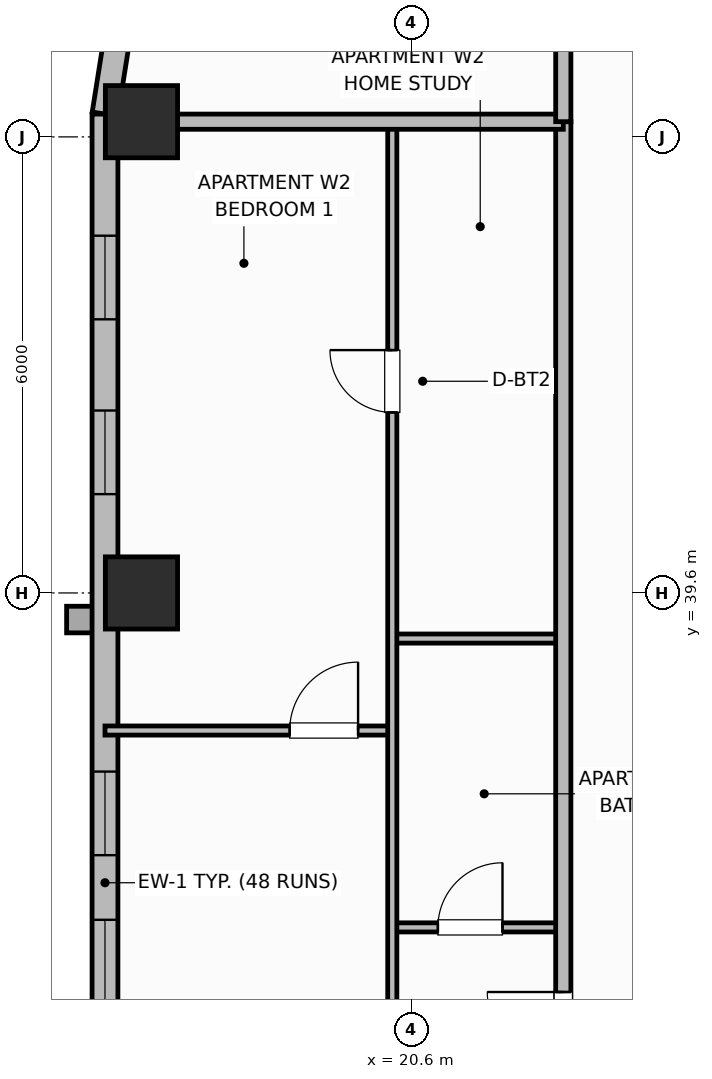
"""IFC4 building model, lengths in metres.
Left out: names, types, materials, properties, quantities, classifications, styles, units other than length and angle.
Written with IfcOpenShell. Run it as: python <this file> out.ifc"""

import sys

from ifc_helpers import new_model, si_unit, direction, frame, frame_2d, origin, origin_2d, place, context, subcontext, project, spatial, rectangle, extrude, element, fill, save


model = new_model("IFC4")
c1 = context("Model", 3, precision=1e-05, world=origin(), true_north=direction((0.0, 1.0)))
c2 = subcontext(c1, "Body", "Model", "MODEL_VIEW")
j1 = project(units=[si_unit("LENGTHUNIT", "METRE"), si_unit("PLANEANGLEUNIT", "RADIAN")], contexts=[c1])
p1 = place(None, origin())
s1 = spatial("IfcSite", under=j1, at=p1, CompositionType="ELEMENT")
p2 = place(p1, origin())
s2 = spatial("IfcBuilding", under=s1, at=p2, CompositionType="ELEMENT")
p3 = place(p2, frame((0.0, 0.0, 177.4)))
s3 = spatial("IfcBuildingStorey", under=s2, at=p3, CompositionType="ELEMENT", Elevation=177.4)
for number, where, z_axis, x_axis in (
    (1, (17.05, 39.6, 0.0), (0.0, 0.0, 1.0), (1.0, 0.0, 0.0)),
    (2, (17.05, 45.8, 0.0), (0.0, 0.0, 1.0), (1.0, 0.0, 0.0)),
):
    element("IfcColumn", number, at=place(p3, frame(where, z_axis=z_axis, x_axis=x_axis)), inside=s3, PredefinedType="COLUMN", context=c2, shape_type="SweptSolid", body=[
        extrude(rectangle(XDim=0.95, YDim=0.95, at=origin_2d()), origin(), (0.0, 0.0, 1.0), 3.7),
    ])
p4 = place(p3, frame((16.748, 47.022, 0.0), z_axis=(0.0, 0.0, 1.0), x_axis=(-0.156481329164, -0.987680916907, 0.0)))
e3 = element("IfcWall", 3, at=p4, inside=s3, PredefinedType="SOLIDWALL", context=c2, shape_type="SweptSolid", body=[
    extrude(rectangle(XDim=1.136, YDim=0.34, at=frame_2d((0.568, 0.0))), origin(), (0.0, 0.0, 1.0), 2.72),
])
p5 = place(p3, frame((16.57, 45.9, 0.0), z_axis=(0.0, 0.0, 1.0), x_axis=(0.0, -1.0, 0.0)))
e4 = element("IfcWall", 4, at=p5, inside=s3, PredefinedType="SOLIDWALL", context=c2, shape_type="SweptSolid", body=[
    extrude(rectangle(XDim=13.3, YDim=0.34, at=frame_2d((6.65, 0.0))), origin(), (0.0, 0.0, 1.0), 2.72),
])
p6 = place(p5, frame((1.6, 0.0, 0.95)))
e5 = element("IfcOpeningElement", 5, at=p6, cuts=e4, PredefinedType="OPENING", context=c2, shape_type="SweptSolid", body=[
    extrude(rectangle(XDim=1.1, YDim=1.65, at=frame_2d((0.55, 0.825))), frame((0.0, 0.18, 0.0), z_axis=(0.0, -1.0, 0.0), x_axis=(1.0, 0.0, 0.0)), (0.0, 0.0, 1.0), 0.36),
])
p7 = place(p5, frame((3.9, 0.0, 0.95)))
e6 = element("IfcOpeningElement", 6, at=p7, cuts=e4, PredefinedType="OPENING", context=c2, shape_type="SweptSolid", body=[
    extrude(rectangle(XDim=1.1, YDim=1.65, at=frame_2d((0.55, 0.825))), frame((0.0, 0.18, 0.0), z_axis=(0.0, -1.0, 0.0), x_axis=(1.0, 0.0, 0.0)), (0.0, 0.0, 1.0), 0.36),
])
p8 = place(p5, frame((8.65, 0.0, 0.95)))
e7 = element("IfcOpeningElement", 7, at=p8, cuts=e4, PredefinedType="OPENING", context=c2, shape_type="SweptSolid", body=[
    extrude(rectangle(XDim=1.1, YDim=1.65, at=frame_2d((0.55, 0.825))), frame((0.0, 0.18, 0.0), z_axis=(0.0, -1.0, 0.0), x_axis=(1.0, 0.0, 0.0)), (0.0, 0.0, 1.0), 0.36),
])
p9 = place(p5, frame((10.6, 0.0, 0.95)))
e8 = element("IfcOpeningElement", 8, at=p9, cuts=e4, PredefinedType="OPENING", context=c2, shape_type="SweptSolid", body=[
    extrude(rectangle(XDim=1.1, YDim=1.65, at=frame_2d((0.55, 0.825))), frame((0.0, 0.18, 0.0), z_axis=(0.0, -1.0, 0.0), x_axis=(1.0, 0.0, 0.0)), (0.0, 0.0, 1.0), 0.36),
])
p10 = place(p3, frame((20.35, 35.2, 0.0), z_axis=(0.0, 0.0, 1.0), x_axis=(1.0, 0.0, 0.0)))
e9 = element("IfcWall", 9, at=p10, inside=s3, PredefinedType="PARTITIONING", context=c2, shape_type="SweptSolid", body=[
    extrude(rectangle(XDim=2.25, YDim=0.12, at=frame_2d((1.125, 0.0))), origin(), (0.0, 0.0, 1.0), 2.55),
])
p11 = place(p10, frame((0.6, 0.0, 0.0)))
e10 = element("IfcOpeningElement", 10, at=p11, cuts=e9, PredefinedType="OPENING", context=c2, shape_type="SweptSolid", body=[
    extrude(rectangle(XDim=0.85, YDim=2.1, at=frame_2d((0.425, 1.05))), frame((0.0, 0.07, 0.0), z_axis=(0.0, -1.0, 0.0), x_axis=(1.0, 0.0, 0.0)), (0.0, 0.0, 1.0), 0.14),
])
p12 = place(p3, frame((20.35, 39.0, 0.0), z_axis=(0.0, 0.0, 1.0), x_axis=(1.0, 0.0, 0.0)))
e11 = element("IfcWall", 11, at=p12, inside=s3, PredefinedType="PARTITIONING", context=c2, shape_type="SweptSolid", body=[
    extrude(rectangle(XDim=2.25, YDim=0.12, at=frame_2d((1.125, 0.0))), origin(), (0.0, 0.0, 1.0), 2.55),
])
p13 = place(p3, frame((16.57, 37.79, 0.0), z_axis=(0.0, 0.0, 1.0), x_axis=(1.0, 0.0, 0.0)))
e12 = element("IfcWall", 12, at=p13, inside=s3, PredefinedType="PARTITIONING", context=c2, shape_type="SweptSolid", body=[
    extrude(rectangle(XDim=3.78, YDim=0.12, at=frame_2d((1.89, 0.0))), origin(), (0.0, 0.0, 1.0), 2.55),
])
p14 = place(p13, frame((2.43, 0.0, 0.0)))
e13 = element("IfcOpeningElement", 13, at=p14, cuts=e12, PredefinedType="OPENING", context=c2, shape_type="SweptSolid", body=[
    extrude(rectangle(XDim=0.9, YDim=2.1, at=frame_2d((0.45, 1.05))), frame((0.0, 0.07, 0.0), z_axis=(0.0, -1.0, 0.0), x_axis=(1.0, 0.0, 0.0)), (0.0, 0.0, 1.0), 0.14),
])
p15 = place(p3, frame((20.35, 29.84, 0.0), z_axis=(0.0, 0.0, 1.0), x_axis=(0.0, 1.0, 0.0)))
e14 = element("IfcWall", 14, at=p15, inside=s3, PredefinedType="PARTITIONING", context=c2, shape_type="SweptSolid", body=[
    extrude(rectangle(XDim=15.92, YDim=0.12, at=frame_2d((7.96, 0.0))), origin(), (0.0, 0.0, 1.0), 2.55),
])
p16 = place(p15, frame((0.61, 0.0, 0.0)))
e15 = element("IfcOpeningElement", 15, at=p16, cuts=e14, PredefinedType="OPENING", context=c2, shape_type="SweptSolid", body=[
    extrude(rectangle(XDim=0.9, YDim=2.1, at=frame_2d((0.45, 1.05))), frame((0.0, 0.07, 0.0), z_axis=(0.0, -1.0, 0.0), x_axis=(1.0, 0.0, 0.0)), (0.0, 0.0, 1.0), 0.14),
])
p17 = place(p15, frame((12.135, 0.0, 0.0)))
e16 = element("IfcOpeningElement", 16, at=p17, cuts=e14, PredefinedType="OPENING", context=c2, shape_type="SweptSolid", body=[
    extrude(rectangle(XDim=0.82, YDim=2.08, at=frame_2d((0.41, 1.04))), frame((0.0, 0.07, 0.0), z_axis=(0.0, -1.0, 0.0), x_axis=(1.0, 0.0, 0.0)), (0.0, 0.0, 1.0), 0.14),
])
p18 = place(p3, frame((22.6, 10.6, 0.0), z_axis=(0.0, 0.0, 1.0), x_axis=(0.0, 1.0, 0.0)))
e17 = element("IfcWall", 17, at=p18, inside=s3, PredefinedType="PARTITIONING", context=c2, shape_type="SweptSolid", body=[
    extrude(rectangle(XDim=35.2, YDim=0.2, at=frame_2d((17.6, 0.0))), origin(), (0.0, 0.0, 1.0), 2.55),
])
p19 = place(p18, frame((2.65, 0.0, 0.0)))
e18 = element("IfcOpeningElement", 18, at=p19, cuts=e17, PredefinedType="OPENING", context=c2, shape_type="SweptSolid", body=[
    extrude(rectangle(XDim=1.0, YDim=2.15, at=frame_2d((0.5, 1.075))), frame((0.0, 0.11, 0.0), z_axis=(0.0, -1.0, 0.0), x_axis=(1.0, 0.0, 0.0)), (0.0, 0.0, 1.0), 0.22),
])
p20 = place(p18, frame((22.75, 0.0, 0.0)))
e19 = element("IfcOpeningElement", 19, at=p20, cuts=e17, PredefinedType="OPENING", context=c2, shape_type="SweptSolid", body=[
    extrude(rectangle(XDim=1.0, YDim=2.15, at=frame_2d((0.5, 1.075))), frame((0.0, 0.11, 0.0), z_axis=(0.0, -1.0, 0.0), x_axis=(1.0, 0.0, 0.0)), (0.0, 0.0, 1.0), 0.22),
])
p21 = place(p3, frame((16.99, 45.8, 0.0), z_axis=(0.0, 0.0, 1.0), x_axis=(1.0, 0.0, 0.0)))
e20 = element("IfcWall", 20, at=p21, inside=s3, PredefinedType="PARTITIONING", context=c2, shape_type="SweptSolid", body=[
    extrude(rectangle(XDim=5.61, YDim=0.2, at=frame_2d((2.805, 0.0))), origin(), (0.0, 0.0, 1.0), 2.55),
])
p22 = place(p3, frame((22.6, 45.8, 0.0), z_axis=(0.0, 0.0, 1.0), x_axis=(0.0, 1.0, 0.0)))
e21 = element("IfcWall", 21, at=p22, inside=s3, PredefinedType="PARTITIONING", context=c2, shape_type="SweptSolid", body=[
    extrude(rectangle(XDim=3.73, YDim=0.2, at=frame_2d((1.865, 0.0))), origin(), (0.0, 0.0, 1.0), 2.55),
])
p23 = place(p6, origin())
e22 = element("IfcWindow", 22, at=p23, inside=s3, PartitioningType="SINGLE_PANEL", PredefinedType="WINDOW", context=c2, shape_type="SweptSolid", body=[
    extrude(rectangle(XDim=1.1, YDim=1.65, at=frame_2d((0.55, 0.825))), frame((0.0, 0.03, 0.0), z_axis=(0.0, -1.0, 0.0), x_axis=(1.0, 0.0, 0.0)), (0.0, 0.0, 1.0), 0.06),
])
fill(e5, e22)
p24 = place(p7, origin())
e23 = element("IfcWindow", 23, at=p24, inside=s3, PartitioningType="SINGLE_PANEL", PredefinedType="WINDOW", context=c2, shape_type="SweptSolid", body=[
    extrude(rectangle(XDim=1.1, YDim=1.65, at=frame_2d((0.55, 0.825))), frame((0.0, 0.03, 0.0), z_axis=(0.0, -1.0, 0.0), x_axis=(1.0, 0.0, 0.0)), (0.0, 0.0, 1.0), 0.06),
])
fill(e6, e23)
p25 = place(p8, origin())
e24 = element("IfcWindow", 24, at=p25, inside=s3, PartitioningType="SINGLE_PANEL", PredefinedType="WINDOW", context=c2, shape_type="SweptSolid", body=[
    extrude(rectangle(XDim=1.1, YDim=1.65, at=frame_2d((0.55, 0.825))), frame((0.0, 0.03, 0.0), z_axis=(0.0, -1.0, 0.0), x_axis=(1.0, 0.0, 0.0)), (0.0, 0.0, 1.0), 0.06),
])
fill(e7, e24)
p26 = place(p9, origin())
e25 = element("IfcWindow", 25, at=p26, inside=s3, PartitioningType="SINGLE_PANEL", PredefinedType="WINDOW", context=c2, shape_type="SweptSolid", body=[
    extrude(rectangle(XDim=1.1, YDim=1.65, at=frame_2d((0.55, 0.825))), frame((0.0, 0.03, 0.0), z_axis=(0.0, -1.0, 0.0), x_axis=(1.0, 0.0, 0.0)), (0.0, 0.0, 1.0), 0.06),
])
fill(e8, e25)
p27 = place(p11, origin())
e26 = element("IfcDoor", 26, at=p27, inside=s3, OperationType="SINGLE_SWING_RIGHT", PredefinedType="DOOR", context=c2, shape_type="SweptSolid", body=[
    extrude(rectangle(XDim=0.85, YDim=2.1, at=frame_2d((0.425, 1.05))), frame((0.0, 0.025, 0.0), z_axis=(0.0, -1.0, 0.0), x_axis=(1.0, 0.0, 0.0)), (0.0, 0.0, 1.0), 0.05),
])
fill(e10, e26)
p28 = place(p14, origin())
e27 = element("IfcDoor", 27, at=p28, inside=s3, OperationType="SINGLE_SWING_RIGHT", PredefinedType="DOOR", context=c2, shape_type="SweptSolid", body=[
    extrude(rectangle(XDim=0.9, YDim=2.1, at=frame_2d((0.45, 1.05))), frame((0.0, 0.025, 0.0), z_axis=(0.0, -1.0, 0.0), x_axis=(1.0, 0.0, 0.0)), (0.0, 0.0, 1.0), 0.05),
])
fill(e13, e27)
p29 = place(p17, origin())
e28 = element("IfcDoor", 28, at=p29, inside=s3, OperationType="SINGLE_SWING_RIGHT", PredefinedType="DOOR", context=c2, shape_type="SweptSolid", body=[
    extrude(rectangle(XDim=0.82, YDim=2.08, at=frame_2d((0.41, 1.04))), frame((0.0, 0.025, 0.0), z_axis=(0.0, -1.0, 0.0), x_axis=(1.0, 0.0, 0.0)), (0.0, 0.0, 1.0), 0.05),
])
fill(e16, e28)
p30 = place(p20, origin())
e29 = element("IfcDoor", 29, at=p30, inside=s3, OperationType="SINGLE_SWING_RIGHT", PredefinedType="DOOR", context=c2, shape_type="SweptSolid", body=[
    extrude(rectangle(XDim=1.0, YDim=2.15, at=frame_2d((0.5, 1.075))), frame((0.0, 0.025, 0.0), z_axis=(0.0, -1.0, 0.0), x_axis=(1.0, 0.0, 0.0)), (0.0, 0.0, 1.0), 0.05),
])
fill(e19, e29)
save(model, sys.argv[1])
